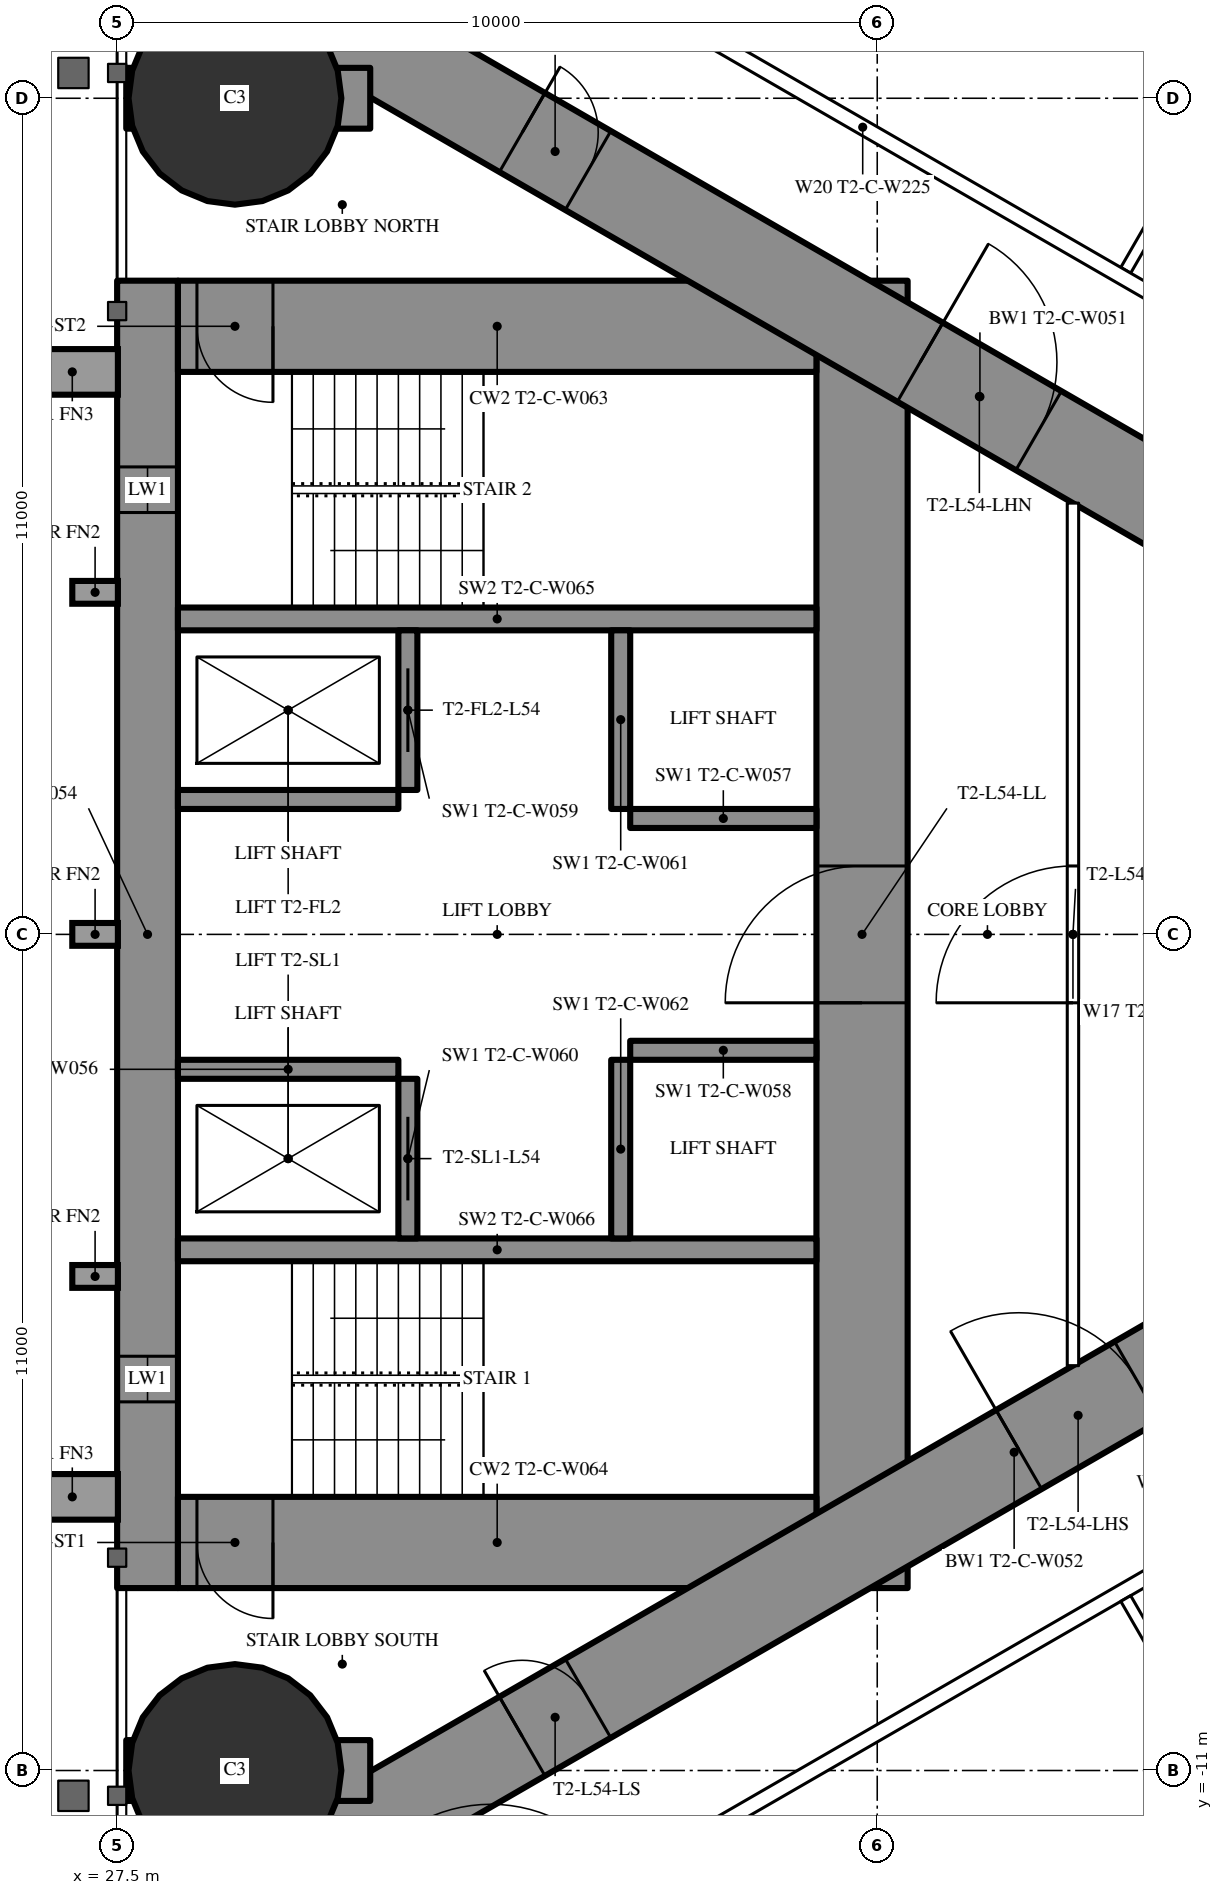
"""IFC4 building model, lengths in metres.
Left out: names, types, materials, properties, quantities, classifications, styles, units other than length and angle.
Written with IfcOpenShell. Run it as: python <this file> out.ifc"""

import sys

from ifc_helpers import new_model, si_unit, direction, frame, frame_2d, origin, origin_2d, place, context, subcontext, project, spatial, rectangle, circle, extrude, element, fill, save


model = new_model("IFC4")
c1 = context("Model", 3, precision=1e-05, world=origin(), true_north=direction((0.0, 1.0)))
c2 = subcontext(c1, "Body", "Model", "MODEL_VIEW")
j1 = project(units=[si_unit("LENGTHUNIT", "METRE"), si_unit("PLANEANGLEUNIT", "RADIAN")], contexts=[c1])
p1 = place(None, origin())
s1 = spatial("IfcSite", under=j1, at=p1, CompositionType="ELEMENT")
p2 = place(p1, origin())
s2 = spatial("IfcBuilding", under=s1, at=p2, CompositionType="ELEMENT")
p3 = place(p2, frame((0.0, 0.0, 201.8)))
s3 = spatial("IfcBuildingStorey", under=s2, at=p3, CompositionType="ELEMENT", Elevation=201.8)
for number, where, z_axis, x_axis in (
    (1, (29.05, 11.0, 0.0), (0.0, 0.0, 1.0), (1.0, 0.0, 0.0)),
    (2, (29.05, -11.0, 0.0), (0.0, 0.0, 1.0), (1.0, 0.0, 0.0)),
):
    element("IfcColumn", number, at=place(p3, frame(where, z_axis=z_axis, x_axis=x_axis)), inside=s3, PredefinedType="COLUMN", context=c2, shape_type="SweptSolid", body=[
        extrude(circle(Radius=1.4, at=origin_2d()), origin(), (0.0, 0.0, 1.0), 3.5),
    ])
p4 = place(p3, frame((27.9, -8.6, 0.0), z_axis=(0.0, 0.0, 1.0), x_axis=(0.0, 1.0, 0.0)))
e3 = element("IfcWall", 3, at=p4, inside=s3, PredefinedType="SHEAR", context=c2, shape_type="SweptSolid", body=[
    extrude(rectangle(XDim=17.2, YDim=0.8, at=frame_2d((8.6, 0.0))), origin(), (0.0, 0.0, 1.0), 3.5),
])
p5 = place(p4, frame((2.45, 0.0, 0.6)))
e4 = element("IfcOpeningElement", 4, at=p5, cuts=e3, PredefinedType="OPENING", context=c2, shape_type="SweptSolid", body=[
    extrude(rectangle(XDim=0.6, YDim=2.1, at=frame_2d((0.3, 1.05))), frame((0.0, 0.41, 0.0), z_axis=(0.0, -1.0, 0.0), x_axis=(1.0, 0.0, 0.0)), (0.0, 0.0, 1.0), 0.82),
])
p6 = place(p4, frame((14.15, 0.0, 0.6)))
e5 = element("IfcOpeningElement", 5, at=p6, cuts=e3, PredefinedType="OPENING", context=c2, shape_type="SweptSolid", body=[
    extrude(rectangle(XDim=0.6, YDim=2.1, at=frame_2d((0.3, 1.05))), frame((0.0, 0.41, 0.0), z_axis=(0.0, -1.0, 0.0), x_axis=(1.0, 0.0, 0.0)), (0.0, 0.0, 1.0), 0.82),
])
p7 = place(p3, frame((37.3, -8.6, 0.0), z_axis=(0.0, 0.0, 1.0), x_axis=(0.0, 1.0, 0.0)))
e6 = element("IfcWall", 6, at=p7, inside=s3, PredefinedType="SHEAR", context=c2, shape_type="SweptSolid", body=[
    extrude(rectangle(XDim=17.2, YDim=1.2, at=frame_2d((8.6, 0.0))), origin(), (0.0, 0.0, 1.0), 3.5),
])
p8 = place(p7, frame((7.7, 0.0, 0.0)))
e7 = element("IfcOpeningElement", 7, at=p8, cuts=e6, PredefinedType="OPENING", context=c2, shape_type="SweptSolid", body=[
    extrude(rectangle(XDim=1.8, YDim=2.2, at=frame_2d((0.9, 1.1))), frame((0.0, 0.61, 0.0), z_axis=(0.0, -1.0, 0.0), x_axis=(1.0, 0.0, 0.0)), (0.0, 0.0, 1.0), 1.22),
])
p9 = place(p3, frame((28.3, -8.0, 0.0), z_axis=(0.0, 0.0, 1.0), x_axis=(1.0, 0.0, 0.0)))
e8 = element("IfcWall", 8, at=p9, inside=s3, PredefinedType="SHEAR", context=c2, shape_type="SweptSolid", body=[
    extrude(rectangle(XDim=8.4, YDim=1.2, at=frame_2d((4.2, 0.0))), origin(), (0.0, 0.0, 1.0), 3.5),
])
p10 = place(p9, frame((0.25, 0.0, 0.0)))
e9 = element("IfcOpeningElement", 9, at=p10, cuts=e8, PredefinedType="OPENING", context=c2, shape_type="SweptSolid", body=[
    extrude(rectangle(XDim=1.0, YDim=2.2, at=frame_2d((0.5, 1.1))), frame((0.0, 0.61, 0.0), z_axis=(0.0, -1.0, 0.0), x_axis=(1.0, 0.0, 0.0)), (0.0, 0.0, 1.0), 1.22),
])
p11 = place(p3, frame((28.3, 8.0, 0.0), z_axis=(0.0, 0.0, 1.0), x_axis=(1.0, 0.0, 0.0)))
e10 = element("IfcWall", 10, at=p11, inside=s3, PredefinedType="SHEAR", context=c2, shape_type="SweptSolid", body=[
    extrude(rectangle(XDim=8.4, YDim=1.2, at=frame_2d((4.2, 0.0))), origin(), (0.0, 0.0, 1.0), 3.5),
])
p12 = place(p11, frame((0.25, 0.0, 0.0)))
e11 = element("IfcOpeningElement", 11, at=p12, cuts=e10, PredefinedType="OPENING", context=c2, shape_type="SweptSolid", body=[
    extrude(rectangle(XDim=1.0, YDim=2.2, at=frame_2d((0.5, 1.1))), frame((0.0, 0.61, 0.0), z_axis=(0.0, -1.0, 0.0), x_axis=(1.0, 0.0, 0.0)), (0.0, 0.0, 1.0), 1.22),
])
for number, where, z_axis, x_axis in (
    (12, (28.3, -4.15, 0.0), (0.0, 0.0, 1.0), (1.0, 0.0, 0.0)),
    (13, (28.3, 4.15, 0.0), (0.0, 0.0, 1.0), (1.0, 0.0, 0.0)),
):
    element("IfcWall", number, at=place(p3, frame(where, z_axis=z_axis, x_axis=x_axis)), inside=s3, PredefinedType="SHEAR", context=c2, shape_type="SweptSolid", body=[
        extrude(rectangle(XDim=8.4, YDim=0.3, at=frame_2d((4.2, 0.0))), origin(), (0.0, 0.0, 1.0), 3.5),
    ])
p13 = place(p3, frame((31.325, -4.0, 0.0), z_axis=(0.0, 0.0, 1.0), x_axis=(0.0, 1.0, 0.0)))
e14 = element("IfcWall", 14, at=p13, inside=s3, PredefinedType="SHEAR", context=c2, shape_type="SweptSolid", body=[
    extrude(rectangle(XDim=2.1, YDim=0.25, at=frame_2d((1.05, 0.0))), origin(), (0.0, 0.0, 1.0), 3.5),
])
p14 = place(p13, frame((0.5, 0.0, 0.0)))
e15 = element("IfcOpeningElement", 15, at=p14, cuts=e14, PredefinedType="OPENING", context=c2, shape_type="SweptSolid", body=[
    extrude(rectangle(XDim=1.1, YDim=2.2, at=frame_2d((0.55, 1.1))), frame((0.0, 0.135, 0.0), z_axis=(0.0, -1.0, 0.0), x_axis=(1.0, 0.0, 0.0)), (0.0, 0.0, 1.0), 0.27),
])
p15 = place(p3, frame((34.125, -4.0, 0.0), z_axis=(0.0, 0.0, 1.0), x_axis=(0.0, 1.0, 0.0)))
e16 = element("IfcWall", 16, at=p15, inside=s3, PredefinedType="SHEAR", context=c2, shape_type="SweptSolid", body=[
    extrude(rectangle(XDim=2.35, YDim=0.25, at=frame_2d((1.175, 0.0))), origin(), (0.0, 0.0, 1.0), 3.5),
])
p16 = place(p3, frame((28.3, -1.775, 0.0), z_axis=(0.0, 0.0, 1.0), x_axis=(1.0, 0.0, 0.0)))
e17 = element("IfcWall", 17, at=p16, inside=s3, PredefinedType="SHEAR", context=c2, shape_type="SweptSolid", body=[
    extrude(rectangle(XDim=2.9, YDim=0.25, at=frame_2d((1.45, 0.0))), origin(), (0.0, 0.0, 1.0), 3.5),
])
p17 = place(p3, frame((34.25, -1.525, 0.0), z_axis=(0.0, 0.0, 1.0), x_axis=(1.0, 0.0, 0.0)))
e18 = element("IfcWall", 18, at=p17, inside=s3, PredefinedType="SHEAR", context=c2, shape_type="SweptSolid", body=[
    extrude(rectangle(XDim=2.45, YDim=0.25, at=frame_2d((1.225, 0.0))), origin(), (0.0, 0.0, 1.0), 3.5),
])
p18 = place(p3, frame((31.325, 1.9, 0.0), z_axis=(0.0, 0.0, 1.0), x_axis=(0.0, 1.0, 0.0)))
e19 = element("IfcWall", 19, at=p18, inside=s3, PredefinedType="SHEAR", context=c2, shape_type="SweptSolid", body=[
    extrude(rectangle(XDim=2.1, YDim=0.25, at=frame_2d((1.05, 0.0))), origin(), (0.0, 0.0, 1.0), 3.5),
])
p19 = place(p18, frame((0.5, 0.0, 0.0)))
e20 = element("IfcOpeningElement", 20, at=p19, cuts=e19, PredefinedType="OPENING", context=c2, shape_type="SweptSolid", body=[
    extrude(rectangle(XDim=1.1, YDim=2.2, at=frame_2d((0.55, 1.1))), frame((0.0, 0.135, 0.0), z_axis=(0.0, -1.0, 0.0), x_axis=(1.0, 0.0, 0.0)), (0.0, 0.0, 1.0), 0.27),
])
p20 = place(p3, frame((34.125, 1.65, 0.0), z_axis=(0.0, 0.0, 1.0), x_axis=(0.0, 1.0, 0.0)))
e21 = element("IfcWall", 21, at=p20, inside=s3, PredefinedType="SHEAR", context=c2, shape_type="SweptSolid", body=[
    extrude(rectangle(XDim=2.35, YDim=0.25, at=frame_2d((1.175, 0.0))), origin(), (0.0, 0.0, 1.0), 3.5),
])
p21 = place(p3, frame((28.3, 1.775, 0.0), z_axis=(0.0, 0.0, 1.0), x_axis=(1.0, 0.0, 0.0)))
e22 = element("IfcWall", 22, at=p21, inside=s3, PredefinedType="SHEAR", context=c2, shape_type="SweptSolid", body=[
    extrude(rectangle(XDim=2.9, YDim=0.25, at=frame_2d((1.45, 0.0))), origin(), (0.0, 0.0, 1.0), 3.5),
])
p22 = place(p3, frame((34.25, 1.525, 0.0), z_axis=(0.0, 0.0, 1.0), x_axis=(1.0, 0.0, 0.0)))
e23 = element("IfcWall", 23, at=p22, inside=s3, PredefinedType="SHEAR", context=c2, shape_type="SweptSolid", body=[
    extrude(rectangle(XDim=2.45, YDim=0.25, at=frame_2d((1.225, 0.0))), origin(), (0.0, 0.0, 1.0), 3.5),
])
p23 = place(p3, frame((27.2, -13.8, 0.0), z_axis=(0.0, 0.0, 1.0), x_axis=(0.866027159892, 0.499996958321, 0.0)))
e24 = element("IfcWall", 24, at=p23, inside=s3, PredefinedType="SHEAR", context=c2, shape_type="SweptSolid", body=[
    extrude(rectangle(XDim=27.947, YDim=1.2, at=frame_2d((13.973, 0.0))), origin(), (0.0, 0.0, 1.0), 3.5),
])
p24 = place(p23, frame((6.5, 0.0, 0.0)))
e25 = element("IfcOpeningElement", 25, at=p24, cuts=e24, PredefinedType="OPENING", context=c2, shape_type="SweptSolid", body=[
    extrude(rectangle(XDim=1.0, YDim=2.2, at=frame_2d((0.5, 1.1))), frame((0.0, 0.61, 0.0), z_axis=(0.0, -1.0, 0.0), x_axis=(1.0, 0.0, 0.0)), (0.0, 0.0, 1.0), 1.22),
])
p25 = place(p23, frame((14.045, 0.0, 0.0)))
e26 = element("IfcOpeningElement", 26, at=p25, cuts=e24, PredefinedType="OPENING", context=c2, shape_type="SweptSolid", body=[
    extrude(rectangle(XDim=1.8, YDim=2.2, at=frame_2d((0.9, 1.1))), frame((0.0, 0.61, 0.0), z_axis=(0.0, -1.0, 0.0), x_axis=(1.0, 0.0, 0.0)), (0.0, 0.0, 1.0), 1.22),
])
p26 = place(p3, frame((27.2, 13.8, 0.0), z_axis=(0.0, 0.0, 1.0), x_axis=(0.866024515034, -0.500001539357, 0.0)))
e27 = element("IfcWall", 27, at=p26, inside=s3, PredefinedType="SHEAR", context=c2, shape_type="SweptSolid", body=[
    extrude(rectangle(XDim=26.907, YDim=1.2, at=frame_2d((13.454, 0.0))), origin(), (0.0, 0.0, 1.0), 3.5),
])
p27 = place(p26, frame((6.5, 0.0, 0.0)))
e28 = element("IfcOpeningElement", 28, at=p27, cuts=e27, PredefinedType="OPENING", context=c2, shape_type="SweptSolid", body=[
    extrude(rectangle(XDim=1.0, YDim=2.2, at=frame_2d((0.5, 1.1))), frame((0.0, 0.61, 0.0), z_axis=(0.0, -1.0, 0.0), x_axis=(1.0, 0.0, 0.0)), (0.0, 0.0, 1.0), 1.22),
])
p28 = place(p26, frame((12.545, 0.0, 0.0)))
e29 = element("IfcOpeningElement", 29, at=p28, cuts=e27, PredefinedType="OPENING", context=c2, shape_type="SweptSolid", body=[
    extrude(rectangle(XDim=1.8, YDim=2.2, at=frame_2d((0.9, 1.1))), frame((0.0, 0.61, 0.0), z_axis=(0.0, -1.0, 0.0), x_axis=(1.0, 0.0, 0.0)), (0.0, 0.0, 1.0), 1.22),
])
for number, where, z_axis, x_axis in (
    (30, (27.62, -11.0, 0.0), (0.0, 0.0, 1.0), (1.0, 0.0, 0.0)),
    (31, (27.62, 11.0, 0.0), (0.0, 0.0, 1.0), (1.0, 0.0, 0.0)),
):
    element("IfcWall", number, at=place(p3, frame(where, z_axis=z_axis, x_axis=x_axis)), inside=s3, PredefinedType="SHEAR", context=c2, shape_type="SweptSolid", body=[
        extrude(rectangle(XDim=3.209, YDim=0.8, at=frame_2d((1.605, 0.0))), origin(), (0.0, 0.0, 1.0), 3.5),
    ])
p29 = place(p3, frame((27.903, -16.05, 0.0), z_axis=(0.0, 0.0, 1.0), x_axis=(0.866022581743, 0.500004887887, 0.0)))
e32 = element("IfcWall", 32, at=p29, inside=s3, PredefinedType="PARTITIONING", context=c2, shape_type="SweptSolid", body=[
    extrude(rectangle(XDim=32.1, YDim=0.2, at=frame_2d((16.05, 0.0))), origin(), (0.0, 0.0, 1.0), 3.25),
])
p30 = place(p29, frame((5.212, 0.0, 0.0)))
e33 = element("IfcOpeningElement", 33, at=p30, cuts=e32, PredefinedType="OPENING", context=c2, shape_type="SweptSolid", body=[
    extrude(rectangle(XDim=2.0, YDim=2.4, at=frame_2d((1.0, 1.2))), frame((0.0, 0.11, 0.0), z_axis=(0.0, -1.0, 0.0), x_axis=(1.0, 0.0, 0.0)), (0.0, 0.0, 1.0), 0.22),
])
p31 = place(p29, frame((18.133, 0.0, 0.0)))
e34 = element("IfcOpeningElement", 34, at=p31, cuts=e32, PredefinedType="OPENING", context=c2, shape_type="SweptSolid", body=[
    extrude(rectangle(XDim=2.0, YDim=2.4, at=frame_2d((1.0, 1.2))), frame((0.0, 0.11, 0.0), z_axis=(0.0, -1.0, 0.0), x_axis=(1.0, 0.0, 0.0)), (0.0, 0.0, 1.0), 0.22),
])
p32 = place(p29, frame((24.717, 0.0, 0.0)))
e35 = element("IfcOpeningElement", 35, at=p32, cuts=e32, PredefinedType="OPENING", context=c2, shape_type="SweptSolid", body=[
    extrude(rectangle(XDim=2.0, YDim=2.4, at=frame_2d((1.0, 1.2))), frame((0.0, 0.11, 0.0), z_axis=(0.0, -1.0, 0.0), x_axis=(1.0, 0.0, 0.0)), (0.0, 0.0, 1.0), 0.22),
])
p33 = place(p29, frame((28.836, 0.0, 0.0)))
e36 = element("IfcOpeningElement", 36, at=p33, cuts=e32, PredefinedType="OPENING", context=c2, shape_type="SweptSolid", body=[
    extrude(rectangle(XDim=2.0, YDim=2.4, at=frame_2d((1.0, 1.2))), frame((0.0, 0.11, 0.0), z_axis=(0.0, -1.0, 0.0), x_axis=(1.0, 0.0, 0.0)), (0.0, 0.0, 1.0), 0.22),
])
for number, where, z_axis, x_axis in (
    (37, (40.769, -8.737, 0.0), (0.0, 0.0, 1.0), (0.5, -0.866, 0.0)),
    (38, (40.769, 8.737, 0.0), (0.0, 0.0, 1.0), (0.5, 0.866, 0.0)),
):
    element("IfcWall", number, at=place(p3, frame(where, z_axis=z_axis, x_axis=x_axis)), inside=s3, PredefinedType="PARTITIONING", context=c2, shape_type="SweptSolid", body=[
        extrude(rectangle(XDim=7.198, YDim=0.15, at=frame_2d((3.599, 0.0))), origin(), (0.0, 0.0, 1.0), 2.05),
    ])
p34 = place(p3, frame((27.903, 16.05, 0.0), z_axis=(0.0, 0.0, 1.0), x_axis=(0.866024818307, -0.500001014076, 0.0)))
e39 = element("IfcWall", 39, at=p34, inside=s3, PredefinedType="PARTITIONING", context=c2, shape_type="SweptSolid", body=[
    extrude(rectangle(XDim=21.723, YDim=0.2, at=frame_2d((10.862, 0.0))), origin(), (0.0, 0.0, 1.0), 3.25),
])
p35 = place(p34, frame((15.966, 0.0, 0.0)))
e40 = element("IfcOpeningElement", 40, at=p35, cuts=e39, PredefinedType="OPENING", context=c2, shape_type="SweptSolid", body=[
    extrude(rectangle(XDim=2.0, YDim=2.03, at=frame_2d((1.0, 1.015))), frame((0.0, 0.11, 0.0), z_axis=(0.0, -1.0, 0.0), x_axis=(1.0, 0.0, 0.0)), (0.0, 0.0, 1.0), 0.22),
])
p36 = place(p34, frame((5.662, 0.0, 0.0)))
e41 = element("IfcOpeningElement", 41, at=p36, cuts=e39, PredefinedType="OPENING", context=c2, shape_type="SweptSolid", body=[
    extrude(rectangle(XDim=2.0, YDim=2.4, at=frame_2d((1.0, 1.2))), frame((0.0, 0.11, 0.0), z_axis=(0.0, -1.0, 0.0), x_axis=(1.0, 0.0, 0.0)), (0.0, 0.0, 1.0), 0.22),
])
p37 = place(p34, frame((19.415, 0.0, 0.0)))
e42 = element("IfcOpeningElement", 42, at=p37, cuts=e39, PredefinedType="OPENING", context=c2, shape_type="SweptSolid", body=[
    extrude(rectangle(XDim=1.8, YDim=2.2, at=frame_2d((0.9, 1.1))), frame((0.0, 0.11, 0.0), z_axis=(0.0, -1.0, 0.0), x_axis=(1.0, 0.0, 0.0)), (0.0, 0.0, 1.0), 0.22),
])
p38 = place(p3, frame((40.075, -5.674, 0.0), z_axis=(0.0, 0.0, 1.0), x_axis=(0.0, 1.0, 0.0)))
e43 = element("IfcWall", 43, at=p38, inside=s3, PredefinedType="PARTITIONING", context=c2, shape_type="SweptSolid", body=[
    extrude(rectangle(XDim=11.348, YDim=0.15, at=frame_2d((5.674, 0.0))), origin(), (0.0, 0.0, 1.0), 3.25),
])
p39 = place(p38, frame((4.774, 0.0, 0.0)))
e44 = element("IfcOpeningElement", 44, at=p39, cuts=e43, PredefinedType="OPENING", context=c2, shape_type="SweptSolid", body=[
    extrude(rectangle(XDim=1.8, YDim=2.2, at=frame_2d((0.9, 1.1))), frame((0.0, 0.085, 0.0), z_axis=(0.0, -1.0, 0.0), x_axis=(1.0, 0.0, 0.0)), (0.0, 0.0, 1.0), 0.17),
])
p40 = place(p39, origin())
e45 = element("IfcDoor", 45, at=p40, inside=s3, OperationType="DOUBLE_DOOR_SINGLE_SWING", PredefinedType="DOOR", context=c2, shape_type="SweptSolid", body=[
    extrude(rectangle(XDim=1.8, YDim=2.2, at=frame_2d((0.9, 1.1))), frame((0.0, 0.025, 0.0), z_axis=(0.0, -1.0, 0.0), x_axis=(1.0, 0.0, 0.0)), (0.0, 0.0, 1.0), 0.05),
])
fill(e44, e45)
p41 = place(p24, origin())
e46 = element("IfcDoor", 46, at=p41, inside=s3, OperationType="SINGLE_SWING_LEFT", PredefinedType="DOOR", context=c2, shape_type="SweptSolid", body=[
    extrude(rectangle(XDim=1.0, YDim=2.2, at=frame_2d((0.5, 1.1))), frame((0.0, 0.025, 0.0), z_axis=(0.0, -1.0, 0.0), x_axis=(1.0, 0.0, 0.0)), (0.0, 0.0, 1.0), 0.05),
])
fill(e25, e46)
p42 = place(p25, origin())
e47 = element("IfcDoor", 47, at=p42, inside=s3, OperationType="DOUBLE_DOOR_SINGLE_SWING", PredefinedType="DOOR", context=c2, shape_type="SweptSolid", body=[
    extrude(rectangle(XDim=1.8, YDim=2.2, at=frame_2d((0.9, 1.1))), frame((0.0, 0.025, 0.0), z_axis=(0.0, -1.0, 0.0), x_axis=(1.0, 0.0, 0.0)), (0.0, 0.0, 1.0), 0.05),
])
fill(e26, e47)
p43 = place(p27, origin())
e48 = element("IfcDoor", 48, at=p43, inside=s3, OperationType="SINGLE_SWING_LEFT", PredefinedType="DOOR", context=c2, shape_type="SweptSolid", body=[
    extrude(rectangle(XDim=1.0, YDim=2.2, at=frame_2d((0.5, 1.1))), frame((0.0, 0.025, 0.0), z_axis=(0.0, -1.0, 0.0), x_axis=(1.0, 0.0, 0.0)), (0.0, 0.0, 1.0), 0.05),
])
fill(e28, e48)
p44 = place(p28, origin())
e49 = element("IfcDoor", 49, at=p44, inside=s3, OperationType="DOUBLE_DOOR_SINGLE_SWING", PredefinedType="DOOR", context=c2, shape_type="SweptSolid", body=[
    extrude(rectangle(XDim=1.8, YDim=2.2, at=frame_2d((0.9, 1.1))), frame((0.0, 0.025, 0.0), z_axis=(0.0, -1.0, 0.0), x_axis=(1.0, 0.0, 0.0)), (0.0, 0.0, 1.0), 0.05),
])
fill(e29, e49)
p45 = place(p8, origin())
e50 = element("IfcDoor", 50, at=p45, inside=s3, OperationType="DOUBLE_DOOR_SINGLE_SWING", PredefinedType="DOOR", context=c2, shape_type="SweptSolid", body=[
    extrude(rectangle(XDim=1.8, YDim=2.2, at=frame_2d((0.9, 1.1))), frame((0.0, 0.025, 0.0), z_axis=(0.0, -1.0, 0.0), x_axis=(1.0, 0.0, 0.0)), (0.0, 0.0, 1.0), 0.05),
])
fill(e7, e50)
p46 = place(p10, origin())
e51 = element("IfcDoor", 51, at=p46, inside=s3, OperationType="SINGLE_SWING_RIGHT", PredefinedType="DOOR", context=c2, shape_type="SweptSolid", body=[
    extrude(rectangle(XDim=1.0, YDim=2.2, at=frame_2d((0.5, 1.1))), frame((0.0, 0.025, 0.0), z_axis=(0.0, -1.0, 0.0), x_axis=(1.0, 0.0, 0.0)), (0.0, 0.0, 1.0), 0.05),
])
fill(e9, e51)
p47 = place(p12, origin())
e52 = element("IfcDoor", 52, at=p47, inside=s3, OperationType="SINGLE_SWING_RIGHT", PredefinedType="DOOR", context=c2, shape_type="SweptSolid", body=[
    extrude(rectangle(XDim=1.0, YDim=2.2, at=frame_2d((0.5, 1.1))), frame((0.0, 0.025, 0.0), z_axis=(0.0, -1.0, 0.0), x_axis=(1.0, 0.0, 0.0)), (0.0, 0.0, 1.0), 0.05),
])
fill(e11, e52)
p48 = place(p14, origin())
e53 = element("IfcDoor", 53, at=p48, inside=s3, OperationType="SLIDING_TO_LEFT", PredefinedType="USERDEFINED", context=c2, shape_type="SweptSolid", body=[
    extrude(rectangle(XDim=1.1, YDim=2.2, at=frame_2d((0.55, 1.1))), frame((0.0, 0.025, 0.0), z_axis=(0.0, -1.0, 0.0), x_axis=(1.0, 0.0, 0.0)), (0.0, 0.0, 1.0), 0.05),
])
fill(e15, e53)
p49 = place(p19, origin())
e54 = element("IfcDoor", 54, at=p49, inside=s3, OperationType="SLIDING_TO_LEFT", PredefinedType="USERDEFINED", context=c2, shape_type="SweptSolid", body=[
    extrude(rectangle(XDim=1.1, YDim=2.2, at=frame_2d((0.55, 1.1))), frame((0.0, 0.025, 0.0), z_axis=(0.0, -1.0, 0.0), x_axis=(1.0, 0.0, 0.0)), (0.0, 0.0, 1.0), 0.05),
])
fill(e20, e54)
p50 = place(p5, origin())
e55 = element("IfcWindow", 55, at=p50, inside=s3, PartitioningType="SINGLE_PANEL", PredefinedType="WINDOW", context=c2, shape_type="SweptSolid", body=[
    extrude(rectangle(XDim=0.6, YDim=2.1, at=frame_2d((0.3, 1.05))), frame((0.0, 0.03, 0.0), z_axis=(0.0, -1.0, 0.0), x_axis=(1.0, 0.0, 0.0)), (0.0, 0.0, 1.0), 0.06),
])
fill(e4, e55)
p51 = place(p6, origin())
e56 = element("IfcWindow", 56, at=p51, inside=s3, PartitioningType="SINGLE_PANEL", PredefinedType="WINDOW", context=c2, shape_type="SweptSolid", body=[
    extrude(rectangle(XDim=0.6, YDim=2.1, at=frame_2d((0.3, 1.05))), frame((0.0, 0.03, 0.0), z_axis=(0.0, -1.0, 0.0), x_axis=(1.0, 0.0, 0.0)), (0.0, 0.0, 1.0), 0.06),
])
fill(e5, e56)
save(model, sys.argv[1])
